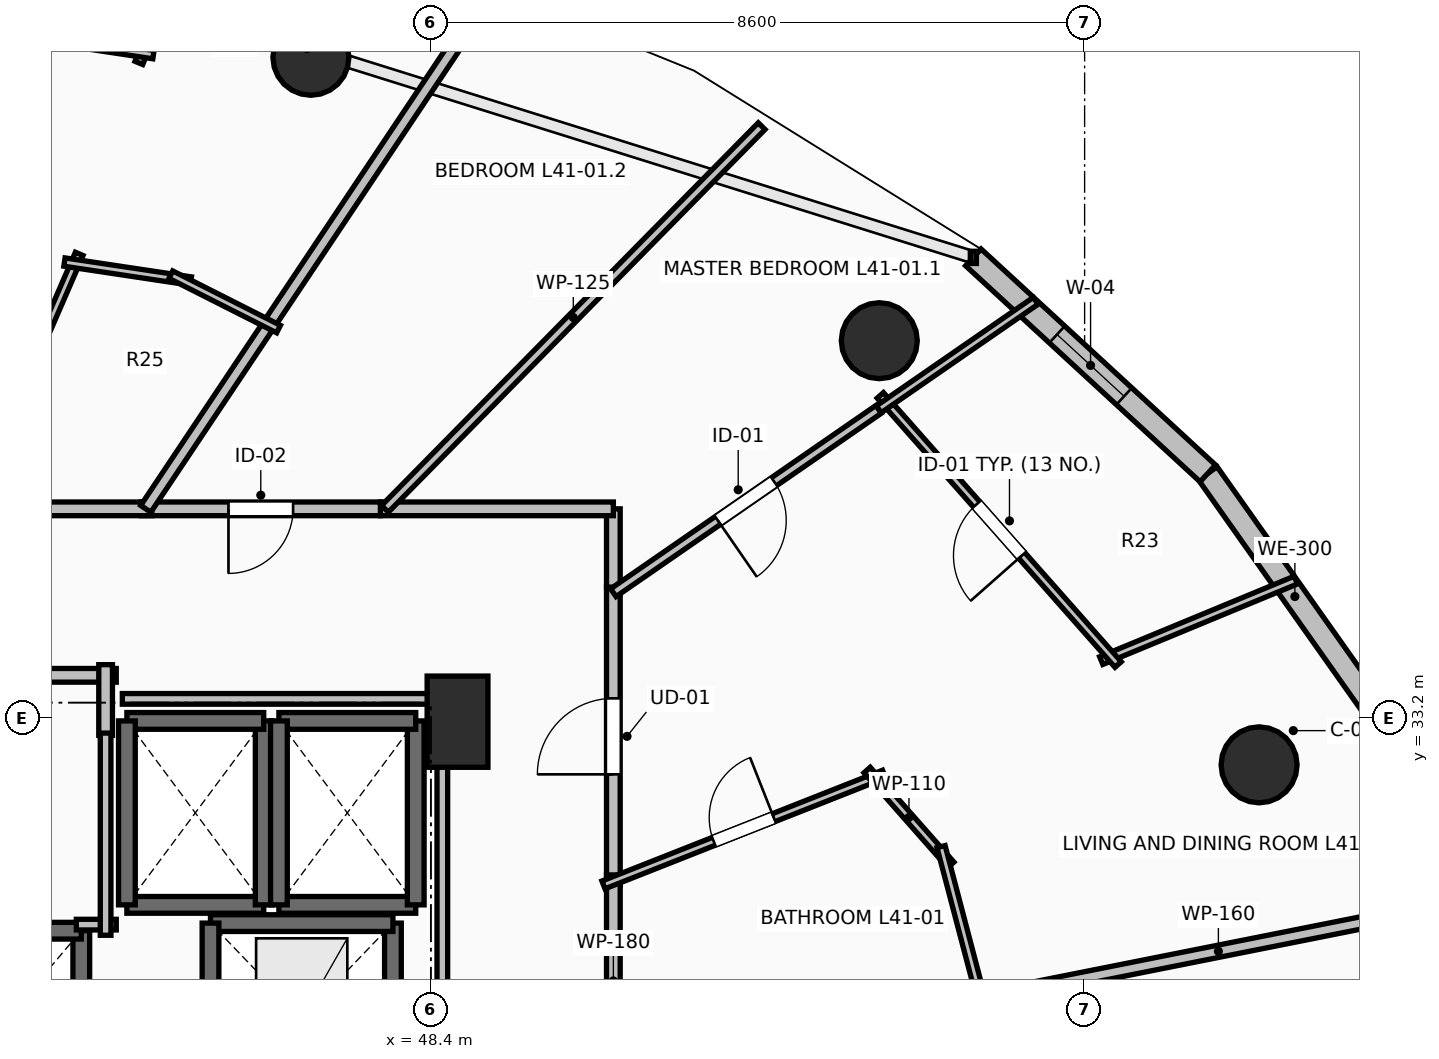
"""IFC4 building model, lengths in metres.
Left out: names, types, materials, properties, quantities, classifications, styles, units other than length and angle.
Written with IfcOpenShell. Run it as: python <this file> out.ifc"""

import sys

from ifc_helpers import new_model, si_unit, direction, frame, frame_2d, origin, origin_2d, place, context, subcontext, project, spatial, rectangle, circle, extrude, element, fill, save


model = new_model("IFC4")
c1 = context("Model", 3, precision=1e-05, world=origin(), true_north=direction((0.0, 1.0)))
c2 = subcontext(c1, "Body", "Model", "MODEL_VIEW")
j1 = project(units=[si_unit("LENGTHUNIT", "METRE"), si_unit("PLANEANGLEUNIT", "RADIAN")], contexts=[c1])
p1 = place(None, origin())
s1 = spatial("IfcSite", under=j1, at=p1, CompositionType="ELEMENT")
p2 = place(p1, origin())
s2 = spatial("IfcBuilding", under=s1, at=p2, CompositionType="ELEMENT")
p3 = place(p2, frame((0.0, 0.0, 153.6)))
s3 = spatial("IfcBuildingStorey", under=s2, at=p3, CompositionType="ELEMENT", Elevation=153.6)
for number, where, z_axis, x_axis in (
    (1, (59.295, 32.582, 0.0), (0.0, 0.0, 1.0), (0.924, 0.383, 0.0)),
    (2, (54.299, 38.162, 0.0), (0.0, 0.0, 1.0), (0.707, 0.707, 0.0)),
    (3, (46.821, 41.891, 0.0), (0.0, 0.0, 1.0), (0.383, 0.924, 0.0)),
):
    element("IfcColumn", number, at=place(p3, frame(where, z_axis=z_axis, x_axis=x_axis)), inside=s3, PredefinedType="COLUMN", context=c2, shape_type="SweptSolid", body=[
        extrude(circle(Radius=0.5, at=origin_2d()), origin(), (0.0, 0.0, 1.0), 3.5),
    ])
p4 = place(p3, frame((48.75, 33.15, 0.0), z_axis=(0.0, 0.0, 1.0), x_axis=(1.0, 0.0, 0.0)))
e4 = element("IfcColumn", 4, at=p4, inside=s3, PredefinedType="PILASTER", context=c2, shape_type="SweptSolid", body=[
    extrude(rectangle(XDim=0.8, YDim=1.2, at=origin_2d()), origin(), (0.0, 0.0, 1.0), 3.5),
])
p5 = place(p3, frame((60.912, 33.175, 0.0), z_axis=(0.0, 0.0, 1.0), x_axis=(-0.577269753207, 0.816553508371, 0.0)))
e5 = element("IfcWall", 5, at=p5, inside=s3, PredefinedType="STANDARD", context=c2, shape_type="SweptSolid", body=[
    extrude(rectangle(XDim=3.97, YDim=0.3, at=frame_2d((1.985, 0.0))), origin(), (0.0, 0.0, 1.0), 3.24),
])
p6 = place(p3, frame((58.62, 36.417, 0.0), z_axis=(0.0, 0.0, 1.0), x_axis=(-0.735477154165, 0.677549522693, 0.0)))
e6 = element("IfcWall", 6, at=p6, inside=s3, PredefinedType="STANDARD", context=c2, shape_type="SweptSolid", body=[
    extrude(rectangle(XDim=4.194, YDim=0.3, at=frame_2d((2.097, 0.0))), origin(), (0.0, 0.0, 1.0), 3.24),
])
p7 = place(p6, frame((1.497, 0.0, 0.85)))
e7 = element("IfcOpeningElement", 7, at=p7, cuts=e6, PredefinedType="OPENING", context=c2, shape_type="SweptSolid", body=[
    extrude(rectangle(XDim=1.2, YDim=2.1, at=frame_2d((0.6, 1.05))), frame((0.0, 0.165, 0.0), z_axis=(0.0, -1.0, 0.0), x_axis=(1.0, 0.0, 0.0)), (0.0, 0.0, 1.0), 0.33),
])
p8 = place(p3, frame((43.8, 27.8, 0.0), z_axis=(0.0, 0.0, 1.0), x_axis=(0.0, 1.0, 0.0)))
e8 = element("IfcWall", 8, at=p8, inside=s3, PredefinedType="SOLIDWALL", context=c2, shape_type="SweptSolid", body=[
    extrude(rectangle(XDim=2.6, YDim=0.22, at=frame_2d((1.3, 0.0))), origin(), (0.0, 0.0, 1.0), 3.24),
])
p9 = place(p3, frame((43.8, 30.4, 0.0), z_axis=(0.0, 0.0, 1.0), x_axis=(-1.0, 0.0, 0.0)))
e9 = element("IfcWall", 9, at=p9, inside=s3, PredefinedType="SOLIDWALL", context=c2, shape_type="SweptSolid", body=[
    extrude(rectangle(XDim=2.2, YDim=0.22, at=frame_2d((1.1, 0.0))), origin(), (0.0, 0.0, 1.0), 3.24),
])
p10 = place(p3, frame((44.4, 30.74, 0.0), z_axis=(0.0, 0.0, 1.0), x_axis=(1.0, 0.0, 0.0)))
e10 = element("IfcWall", 10, at=p10, inside=s3, PredefinedType="SOLIDWALL", context=c2, shape_type="SweptSolid", body=[
    extrude(rectangle(XDim=1.8, YDim=0.22, at=frame_2d((0.9, 0.0))), origin(), (0.0, 0.0, 1.0), 3.24),
])
p11 = place(p3, frame((46.2, 30.74, 0.0), z_axis=(0.0, 0.0, 1.0), x_axis=(0.0, 1.0, 0.0)))
e11 = element("IfcWall", 11, at=p11, inside=s3, PredefinedType="SOLIDWALL", context=c2, shape_type="SweptSolid", body=[
    extrude(rectangle(XDim=2.42, YDim=0.22, at=frame_2d((1.21, 0.0))), origin(), (0.0, 0.0, 1.0), 3.24),
])
p12 = place(p3, frame((46.2, 33.16, 0.0), z_axis=(0.0, 0.0, 1.0), x_axis=(-1.0, 0.0, 0.0)))
e12 = element("IfcWall", 12, at=p12, inside=s3, PredefinedType="SOLIDWALL", context=c2, shape_type="SweptSolid", body=[
    extrude(rectangle(XDim=1.8, YDim=0.22, at=frame_2d((0.9, 0.0))), origin(), (0.0, 0.0, 1.0), 3.24),
])
p13 = place(p3, frame((44.4, 33.16, 0.0), z_axis=(0.0, 0.0, 1.0), x_axis=(0.0, -1.0, 0.0)))
e13 = element("IfcWall", 13, at=p13, inside=s3, PredefinedType="SOLIDWALL", context=c2, shape_type="SweptSolid", body=[
    extrude(rectangle(XDim=2.42, YDim=0.22, at=frame_2d((1.21, 0.0))), origin(), (0.0, 0.0, 1.0), 3.24),
])
p14 = place(p3, frame((46.4, 30.74, 0.0), z_axis=(0.0, 0.0, 1.0), x_axis=(1.0, 0.0, 0.0)))
e14 = element("IfcWall", 14, at=p14, inside=s3, PredefinedType="SOLIDWALL", context=c2, shape_type="SweptSolid", body=[
    extrude(rectangle(XDim=1.8, YDim=0.22, at=frame_2d((0.9, 0.0))), origin(), (0.0, 0.0, 1.0), 3.24),
])
p15 = place(p3, frame((48.2, 30.74, 0.0), z_axis=(0.0, 0.0, 1.0), x_axis=(0.0, 1.0, 0.0)))
e15 = element("IfcWall", 15, at=p15, inside=s3, PredefinedType="SOLIDWALL", context=c2, shape_type="SweptSolid", body=[
    extrude(rectangle(XDim=2.42, YDim=0.22, at=frame_2d((1.21, 0.0))), origin(), (0.0, 0.0, 1.0), 3.24),
])
p16 = place(p3, frame((48.2, 33.16, 0.0), z_axis=(0.0, 0.0, 1.0), x_axis=(-1.0, 0.0, 0.0)))
e16 = element("IfcWall", 16, at=p16, inside=s3, PredefinedType="SOLIDWALL", context=c2, shape_type="SweptSolid", body=[
    extrude(rectangle(XDim=1.8, YDim=0.22, at=frame_2d((0.9, 0.0))), origin(), (0.0, 0.0, 1.0), 3.24),
])
p17 = place(p3, frame((46.4, 33.16, 0.0), z_axis=(0.0, 0.0, 1.0), x_axis=(0.0, -1.0, 0.0)))
e17 = element("IfcWall", 17, at=p17, inside=s3, PredefinedType="SOLIDWALL", context=c2, shape_type="SweptSolid", body=[
    extrude(rectangle(XDim=2.42, YDim=0.22, at=frame_2d((1.21, 0.0))), origin(), (0.0, 0.0, 1.0), 3.24),
])
p18 = place(p3, frame((47.9, 28.0, 0.0), z_axis=(0.0, 0.0, 1.0), x_axis=(0.0, 1.0, 0.0)))
e18 = element("IfcWall", 18, at=p18, inside=s3, PredefinedType="SHEAR", context=c2, shape_type="SweptSolid", body=[
    extrude(rectangle(XDim=2.5, YDim=0.22, at=frame_2d((1.25, 0.0))), origin(), (0.0, 0.0, 1.0), 3.24),
])
p19 = place(p3, frame((47.9, 30.5, 0.0), z_axis=(0.0, 0.0, 1.0), x_axis=(-1.0, 0.0, 0.0)))
e19 = element("IfcWall", 19, at=p19, inside=s3, PredefinedType="SHEAR", context=c2, shape_type="SweptSolid", body=[
    extrude(rectangle(XDim=2.4, YDim=0.22, at=frame_2d((1.2, 0.0))), origin(), (0.0, 0.0, 1.0), 3.24),
])
p20 = place(p3, frame((45.5, 30.5, 0.0), z_axis=(0.0, 0.0, 1.0), x_axis=(0.0, -1.0, 0.0)))
e20 = element("IfcWall", 20, at=p20, inside=s3, PredefinedType="SHEAR", context=c2, shape_type="SweptSolid", body=[
    extrude(rectangle(XDim=2.5, YDim=0.22, at=frame_2d((1.25, 0.0))), origin(), (0.0, 0.0, 1.0), 3.24),
])
p21 = place(p3, frame((44.26, 33.76, 0.0), z_axis=(0.0, 0.0, 1.0), x_axis=(-1.0, 0.0, 0.0)))
e21 = element("IfcWall", 21, at=p21, inside=s3, PredefinedType="PARTITIONING", context=c2, shape_type="SweptSolid", body=[
    extrude(rectangle(XDim=6.91, YDim=0.18, at=frame_2d((3.455, 0.0))), origin(), (0.0, 0.0, 1.0), 3.24),
])
p22 = place(p21, frame((3.03, 0.0, 0.0)))
e22 = element("IfcOpeningElement", 22, at=p22, cuts=e21, PredefinedType="OPENING", context=c2, shape_type="SweptSolid", body=[
    extrude(rectangle(XDim=0.85, YDim=2.1, at=frame_2d((0.425, 1.05))), frame((0.0, 0.105, 0.0), z_axis=(0.0, -1.0, 0.0), x_axis=(1.0, 0.0, 0.0)), (0.0, 0.0, 1.0), 0.21),
])
p23 = place(p3, frame((44.12, 32.97, 0.0), z_axis=(0.0, 0.0, 1.0), x_axis=(0.0, 1.0, 0.0)))
e23 = element("IfcWall", 23, at=p23, inside=s3, PredefinedType="PARTITIONING", context=c2, shape_type="SweptSolid", body=[
    extrude(rectangle(XDim=0.93, YDim=0.18, at=frame_2d((0.465, 0.0))), origin(), (0.0, 0.0, 1.0), 3.24),
])
p24 = place(p3, frame((50.8, 30.994, 0.0), z_axis=(0.0, 0.0, 1.0), x_axis=(0.0, 1.0, 0.0)))
e24 = element("IfcWall", 24, at=p24, inside=s3, PredefinedType="PARTITIONING", context=c2, shape_type="SweptSolid", body=[
    extrude(rectangle(XDim=3.926, YDim=0.18, at=frame_2d((1.963, 0.0))), origin(), (0.0, 0.0, 1.0), 2.432),
])
p25 = place(p24, frame((1.463, 0.0, 0.0)))
e25 = element("IfcOpeningElement", 25, at=p25, cuts=e24, PredefinedType="OPENING", context=c2, shape_type="SweptSolid", body=[
    extrude(rectangle(XDim=1.0, YDim=2.15, at=frame_2d((0.5, 1.075))), frame((0.0, 0.105, 0.0), z_axis=(0.0, -1.0, 0.0), x_axis=(1.0, 0.0, 0.0)), (0.0, 0.0, 1.0), 0.21),
])
p26 = place(p3, frame((50.8, 28.346, 0.0), z_axis=(0.0, 0.0, 1.0), x_axis=(0.0, 1.0, 0.0)))
e26 = element("IfcWall", 26, at=p26, inside=s3, PredefinedType="PARTITIONING", context=c2, shape_type="SweptSolid", body=[
    extrude(rectangle(XDim=2.788, YDim=0.18, at=frame_2d((1.394, 0.0))), origin(), (0.0, 0.0, 1.0), 3.24),
])
p27 = place(p3, frame((50.8, 34.92, 0.0), z_axis=(0.0, 0.0, 1.0), x_axis=(0.0, 1.0, 0.0)))
e27 = element("IfcWall", 27, at=p27, inside=s3, PredefinedType="PARTITIONING", context=c2, shape_type="SweptSolid", body=[
    extrude(rectangle(XDim=1.03, YDim=0.18, at=frame_2d((0.515, 0.0))), origin(), (0.0, 0.0, 1.0), 2.432),
])
p28 = place(p3, frame((50.8, 35.95, 0.0), z_axis=(0.0, 0.0, 1.0), x_axis=(-1.0, 0.0, 0.0)))
e28 = element("IfcWall", 28, at=p28, inside=s3, PredefinedType="PARTITIONING", context=c2, shape_type="SweptSolid", body=[
    extrude(rectangle(XDim=3.065, YDim=0.18, at=frame_2d((1.532, 0.0))), origin(), (0.0, 0.0, 1.0), 2.432),
])
p29 = place(p3, frame((47.735, 35.95, 0.0), z_axis=(0.0, 0.0, 1.0), x_axis=(-1.0, 0.0, 0.0)))
e29 = element("IfcWall", 29, at=p29, inside=s3, PredefinedType="PARTITIONING", context=c2, shape_type="SweptSolid", body=[
    extrude(rectangle(XDim=3.147, YDim=0.18, at=frame_2d((1.574, 0.0))), origin(), (0.0, 0.0, 1.0), 2.886),
])
p30 = place(p29, frame((1.148, 0.0, 0.0)))
e30 = element("IfcOpeningElement", 30, at=p30, cuts=e29, PredefinedType="OPENING", context=c2, shape_type="SweptSolid", body=[
    extrude(rectangle(XDim=0.85, YDim=2.1, at=frame_2d((0.425, 1.05))), frame((0.0, 0.105, 0.0), z_axis=(0.0, -1.0, 0.0), x_axis=(1.0, 0.0, 0.0)), (0.0, 0.0, 1.0), 0.21),
])
p31 = place(p3, frame((44.728, 35.95, 0.0), z_axis=(0.0, 0.0, 1.0), x_axis=(-1.0, 0.0, 0.0)))
e31 = element("IfcWall", 31, at=p31, inside=s3, PredefinedType="PARTITIONING", context=c2, shape_type="SweptSolid", body=[
    extrude(rectangle(XDim=2.486, YDim=0.18, at=frame_2d((1.243, 0.0))), origin(), (0.0, 0.0, 1.0), 2.886),
])
p32 = place(p3, frame((50.67, 31.003, 0.0), z_axis=(0.0, 0.0, 1.0), x_axis=(0.930092731386, 0.367324803169, 0.0)))
e32 = element("IfcWall", 32, at=p32, inside=s3, PredefinedType="PARTITIONING", context=c2, shape_type="SweptSolid", body=[
    extrude(rectangle(XDim=3.969, YDim=0.11, at=frame_2d((1.984, 0.0))), origin(), (0.0, 0.0, 1.0), 2.886),
])
p33 = place(p32, frame((1.559, 0.0, 0.0)))
e33 = element("IfcOpeningElement", 33, at=p33, cuts=e32, PredefinedType="OPENING", context=c2, shape_type="SweptSolid", body=[
    extrude(rectangle(XDim=0.85, YDim=2.1, at=frame_2d((0.425, 1.05))), frame((0.0, 0.07, 0.0), z_axis=(0.0, -1.0, 0.0), x_axis=(1.0, 0.0, 0.0)), (0.0, 0.0, 1.0), 0.14),
])
p34 = place(p3, frame((54.138, 32.514, 0.0), z_axis=(0.0, 0.0, 1.0), x_axis=(0.661645897528, -0.749816448396, 0.0)))
e34 = element("IfcWall", 34, at=p34, inside=s3, PredefinedType="PARTITIONING", context=c2, shape_type="SweptSolid", body=[
    extrude(rectangle(XDim=1.664, YDim=0.11, at=frame_2d((0.832, 0.0))), origin(), (0.0, 0.0, 1.0), 3.24),
])
p35 = place(p3, frame((55.111, 31.506, 0.0), z_axis=(0.0, 0.0, 1.0), x_axis=(0.254389812051, -0.967101764823, 0.0)))
e35 = element("IfcWall", 35, at=p35, inside=s3, PredefinedType="PARTITIONING", context=c2, shape_type="SweptSolid", body=[
    extrude(rectangle(XDim=2.206, YDim=0.11, at=frame_2d((1.103, 0.0))), origin(), (0.0, 0.0, 1.0), 3.24),
])
p36 = place(p3, frame((59.778, 35.012, 0.0), z_axis=(0.0, 0.0, 1.0), x_axis=(-0.924067287951, -0.382229835751, 0.0)))
e36 = element("IfcWall", 36, at=p36, inside=s3, PredefinedType="PARTITIONING", context=c2, shape_type="SweptSolid", body=[
    extrude(rectangle(XDim=2.77, YDim=0.11, at=frame_2d((1.385, 0.0))), origin(), (0.0, 0.0, 1.0), 2.728),
])
p37 = place(p3, frame((57.441, 33.902, 0.0), z_axis=(0.0, 0.0, 1.0), x_axis=(-0.662122223318, 0.749395864272, 0.0)))
e37 = element("IfcWall", 37, at=p37, inside=s3, PredefinedType="PARTITIONING", context=c2, shape_type="SweptSolid", body=[
    extrude(rectangle(XDim=4.725, YDim=0.11, at=frame_2d((2.362, 0.0))), origin(), (0.0, 0.0, 1.0), 3.24),
])
p38 = place(p37, frame((1.912, 0.0, 0.0)))
e38 = element("IfcOpeningElement", 38, at=p38, cuts=e37, PredefinedType="OPENING", context=c2, shape_type="SweptSolid", body=[
    extrude(rectangle(XDim=0.9, YDim=2.1, at=frame_2d((0.45, 1.05))), frame((0.0, 0.07, 0.0), z_axis=(0.0, -1.0, 0.0), x_axis=(1.0, 0.0, 0.0)), (0.0, 0.0, 1.0), 0.14),
])
p39 = place(p3, frame((54.29, 37.258, 0.0), z_axis=(0.0, 0.0, 1.0), x_axis=(0.822632807799, 0.568573006335, 0.0)))
e39 = element("IfcWall", 39, at=p39, inside=s3, PredefinedType="PARTITIONING", context=c2, shape_type="SweptSolid", body=[
    extrude(rectangle(XDim=2.512, YDim=0.11, at=frame_2d((1.256, 0.0))), origin(), (0.0, 0.0, 1.0), 2.728),
])
p40 = place(p3, frame((54.29, 37.259, 0.0), z_axis=(0.0, 0.0, 1.0), x_axis=(-0.822672586971, -0.568515448027, 0.0)))
e40 = element("IfcWall", 40, at=p40, inside=s3, PredefinedType="PARTITIONING", context=c2, shape_type="SweptSolid", body=[
    extrude(rectangle(XDim=4.242, YDim=0.125, at=frame_2d((2.121, 0.0))), origin(), (0.0, 0.0, 1.0), 2.432),
])
p41 = place(p40, frame((1.671, 0.0, 0.0)))
e41 = element("IfcOpeningElement", 41, at=p41, cuts=e40, PredefinedType="OPENING", context=c2, shape_type="SweptSolid", body=[
    extrude(rectangle(XDim=0.9, YDim=2.1, at=frame_2d((0.45, 1.05))), frame((0.0, 0.077, 0.0), z_axis=(0.0, -1.0, 0.0), x_axis=(1.0, 0.0, 0.0)), (0.0, 0.0, 1.0), 0.155),
])
p42 = place(p3, frame((55.637, 29.508, 0.0), z_axis=(0.0, 0.0, 1.0), x_axis=(0.98077041661, 0.19516503248, 0.0)))
e42 = element("IfcWall", 42, at=p42, inside=s3, PredefinedType="PARTITIONING", context=c2, shape_type="SweptSolid", body=[
    extrude(rectangle(XDim=6.369, YDim=0.16, at=frame_2d((3.184, 0.0))), origin(), (0.0, 0.0, 1.0), 2.728),
])
p43 = place(p3, frame((52.751, 40.985, 0.0), z_axis=(0.0, 0.0, 1.0), x_axis=(-0.701486551238, -0.712682691268, 0.0)))
e43 = element("IfcWall", 43, at=p43, inside=s3, PredefinedType="PARTITIONING", context=c2, shape_type="SweptSolid", body=[
    extrude(rectangle(XDim=7.065, YDim=0.125, at=frame_2d((3.533, 0.0))), origin(), (0.0, 0.0, 1.0), 2.432),
])
p44 = place(p3, frame((49.131, 42.659, 0.0), z_axis=(0.0, 0.0, 1.0), x_axis=(-0.555600584712, -0.831449331149, 0.0)))
e44 = element("IfcWall", 44, at=p44, inside=s3, PredefinedType="PARTITIONING", context=c2, shape_type="SweptSolid", body=[
    extrude(rectangle(XDim=8.069, YDim=0.16, at=frame_2d((4.035, 0.0))), origin(), (0.0, 0.0, 1.0), 2.432),
])
p45 = place(p3, frame((42.261, 35.822, 0.0), z_axis=(0.0, 0.0, 1.0), x_axis=(0.398098222937, 0.917342795739, 0.0)))
e45 = element("IfcWall", 45, at=p45, inside=s3, PredefinedType="PARTITIONING", context=c2, shape_type="SweptSolid", body=[
    extrude(rectangle(XDim=3.797, YDim=0.11, at=frame_2d((1.898, 0.0))), origin(), (0.0, 0.0, 1.0), 2.886),
])
p46 = place(p45, frame((1.473, 0.0, 0.0)))
e46 = element("IfcOpeningElement", 46, at=p46, cuts=e45, PredefinedType="OPENING", context=c2, shape_type="SweptSolid", body=[
    extrude(rectangle(XDim=0.85, YDim=2.1, at=frame_2d((0.425, 1.05))), frame((0.0, 0.07, 0.0), z_axis=(0.0, -1.0, 0.0), x_axis=(1.0, 0.0, 0.0)), (0.0, 0.0, 1.0), 0.14),
])
p47 = place(p3, frame((43.579, 39.197, 0.0), z_axis=(0.0, 0.0, 1.0), x_axis=(0.988928896576, -0.148390153032, 0.0)))
e47 = element("IfcWall", 47, at=p47, inside=s3, PredefinedType="PARTITIONING", context=c2, shape_type="SweptSolid", body=[
    extrude(rectangle(XDim=1.681, YDim=0.11, at=frame_2d((0.841, 0.0))), origin(), (0.0, 0.0, 1.0), 3.24),
])
p48 = place(p3, frame((44.978, 39.031, 0.0), z_axis=(0.0, 0.0, 1.0), x_axis=(0.892388427115, -0.451268096758, 0.0)))
e48 = element("IfcWall", 48, at=p48, inside=s3, PredefinedType="PARTITIONING", context=c2, shape_type="SweptSolid", body=[
    extrude(rectangle(XDim=1.588, YDim=0.11, at=frame_2d((0.794, 0.0))), origin(), (0.0, 0.0, 1.0), 2.972),
])
p49 = place(p3, frame((45.436, 43.934, 0.0), z_axis=(0.0, 0.0, 1.0), x_axis=(-0.383057133185, -0.923724652002, 0.0)))
e49 = element("IfcWall", 49, at=p49, inside=s3, PredefinedType="PARTITIONING", context=c2, shape_type="SweptSolid", body=[
    extrude(rectangle(XDim=2.292, YDim=0.11, at=frame_2d((1.146, 0.0))), origin(), (0.0, 0.0, 1.0), 2.728),
])
p50 = place(p3, frame((44.75, 41.925, 0.0), z_axis=(0.0, 0.0, 1.0), x_axis=(-0.988899781081, 0.148584060306, 0.0)))
e50 = element("IfcWall", 50, at=p50, inside=s3, PredefinedType="PARTITIONING", context=c2, shape_type="SweptSolid", body=[
    extrude(rectangle(XDim=3.92, YDim=0.11, at=frame_2d((1.96, 0.0))), origin(), (0.0, 0.0, 1.0), 3.24),
])
p51 = place(p50, frame((1.51, 0.0, 0.0)))
e51 = element("IfcOpeningElement", 51, at=p51, cuts=e50, PredefinedType="OPENING", context=c2, shape_type="SweptSolid", body=[
    extrude(rectangle(XDim=0.9, YDim=2.1, at=frame_2d((0.45, 1.05))), frame((0.0, 0.07, 0.0), z_axis=(0.0, -1.0, 0.0), x_axis=(1.0, 0.0, 0.0)), (0.0, 0.0, 1.0), 0.14),
])
p52 = place(p3, frame((43.735, 30.48, 0.0), z_axis=(0.0, 0.0, 1.0), x_axis=(1.0, 0.0, 0.0)))
e52 = element("IfcWall", 52, at=p52, inside=s3, PredefinedType="PARTITIONING", context=c2, shape_type="SweptSolid", body=[
    extrude(rectangle(XDim=0.525, YDim=0.14, at=frame_2d((0.262, 0.0))), origin(), (0.0, 0.0, 1.0), 3.24),
])
p53 = place(p3, frame((44.12, 30.34, 0.0), z_axis=(0.0, 0.0, 1.0), x_axis=(0.0, 1.0, 0.0)))
e53 = element("IfcWall", 53, at=p53, inside=s3, PredefinedType="PARTITIONING", context=c2, shape_type="SweptSolid", body=[
    extrude(rectangle(XDim=2.66, YDim=0.14, at=frame_2d((1.33, 0.0))), origin(), (0.0, 0.0, 1.0), 3.24),
])
p54 = place(p3, frame((48.55, 28.196, 0.0), z_axis=(0.0, 0.0, 1.0), x_axis=(0.0, 1.0, 0.0)))
e54 = element("IfcWall", 54, at=p54, inside=s3, PredefinedType="PARTITIONING", context=c2, shape_type="SweptSolid", body=[
    extrude(rectangle(XDim=5.254, YDim=0.14, at=frame_2d((2.627, 0.0))), origin(), (0.0, 0.0, 1.0), 2.432),
])
p55 = place(p3, frame((48.55, 33.45, 0.0), z_axis=(0.0, 0.0, 1.0), x_axis=(-1.0, 0.0, 0.0)))
e55 = element("IfcWall", 55, at=p55, inside=s3, PredefinedType="PARTITIONING", context=c2, shape_type="SweptSolid", body=[
    extrude(rectangle(XDim=4.21, YDim=0.14, at=frame_2d((2.105, 0.0))), origin(), (0.0, 0.0, 1.0), 2.432),
])
p56 = place(p7, origin())
e56 = element("IfcWindow", 56, at=p56, inside=s3, PartitioningType="SINGLE_PANEL", PredefinedType="WINDOW", context=c2, shape_type="SweptSolid", body=[
    extrude(rectangle(XDim=1.2, YDim=2.1, at=frame_2d((0.6, 1.05))), frame((0.0, 0.03, 0.0), z_axis=(0.0, -1.0, 0.0), x_axis=(1.0, 0.0, 0.0)), (0.0, 0.0, 1.0), 0.06),
])
fill(e7, e56)
p57 = place(p25, origin())
e57 = element("IfcDoor", 57, at=p57, inside=s3, OperationType="SINGLE_SWING_LEFT", PredefinedType="DOOR", context=c2, shape_type="SweptSolid", body=[
    extrude(rectangle(XDim=1.0, YDim=2.15, at=frame_2d((0.5, 1.075))), frame((0.0, 0.025, 0.0), z_axis=(0.0, -1.0, 0.0), x_axis=(1.0, 0.0, 0.0)), (0.0, 0.0, 1.0), 0.05),
])
fill(e25, e57)
p58 = place(p33, origin())
e58 = element("IfcDoor", 58, at=p58, inside=s3, OperationType="SINGLE_SWING_RIGHT", PredefinedType="DOOR", context=c2, shape_type="SweptSolid", body=[
    extrude(rectangle(XDim=0.85, YDim=2.1, at=frame_2d((0.425, 1.05))), frame((0.0, 0.025, 0.0), z_axis=(0.0, -1.0, 0.0), x_axis=(1.0, 0.0, 0.0)), (0.0, 0.0, 1.0), 0.05),
])
fill(e33, e58)
p59 = place(p38, origin())
e59 = element("IfcDoor", 59, at=p59, inside=s3, OperationType="SINGLE_SWING_LEFT", PredefinedType="DOOR", context=c2, shape_type="SweptSolid", body=[
    extrude(rectangle(XDim=0.9, YDim=2.1, at=frame_2d((0.45, 1.05))), frame((0.0, 0.025, 0.0), z_axis=(0.0, -1.0, 0.0), x_axis=(1.0, 0.0, 0.0)), (0.0, 0.0, 1.0), 0.05),
])
fill(e38, e59)
p60 = place(p41, origin())
e60 = element("IfcDoor", 60, at=p60, inside=s3, OperationType="SINGLE_SWING_RIGHT", PredefinedType="DOOR", context=c2, shape_type="SweptSolid", body=[
    extrude(rectangle(XDim=0.9, YDim=2.1, at=frame_2d((0.45, 1.05))), frame((0.0, 0.025, 0.0), z_axis=(0.0, -1.0, 0.0), x_axis=(1.0, 0.0, 0.0)), (0.0, 0.0, 1.0), 0.05),
])
fill(e41, e60)
p61 = place(p30, origin())
e61 = element("IfcDoor", 61, at=p61, inside=s3, OperationType="SINGLE_SWING_RIGHT", PredefinedType="DOOR", context=c2, shape_type="SweptSolid", body=[
    extrude(rectangle(XDim=0.85, YDim=2.1, at=frame_2d((0.425, 1.05))), frame((0.0, 0.025, 0.0), z_axis=(0.0, -1.0, 0.0), x_axis=(1.0, 0.0, 0.0)), (0.0, 0.0, 1.0), 0.05),
])
fill(e30, e61)
save(model, sys.argv[1])
